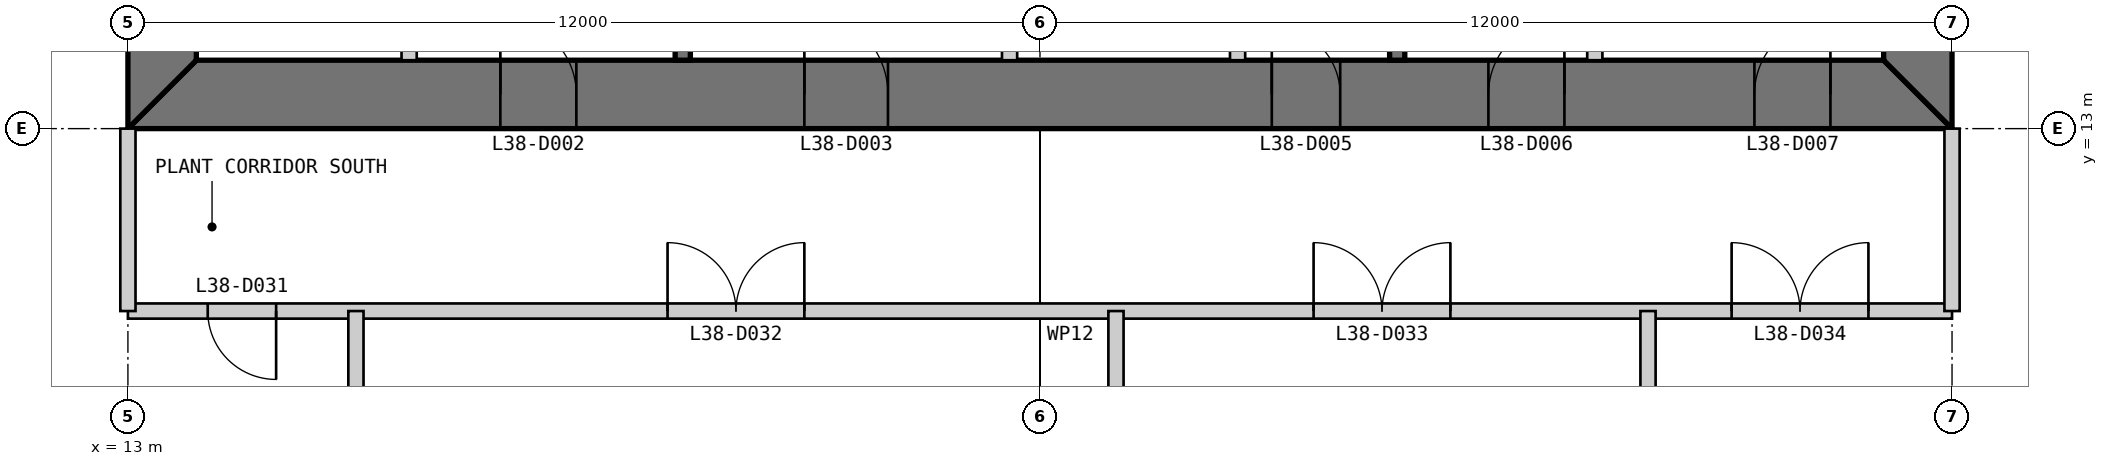
"""IFC4 building model, lengths in metres.
Left out: names, types, materials, properties, quantities, classifications, styles, units other than length and angle.
Written with IfcOpenShell. Run it as: python <this file> out.ifc"""

import sys

from ifc_helpers import new_model, si_unit, direction, frame, frame_2d, origin, place, context, subcontext, project, spatial, polyline, rectangle, outline, extrude, element, fill, save


model = new_model("IFC4")
c1 = context("Model", 3, precision=1e-05, world=origin(), true_north=direction((0.0, 1.0)))
c2 = subcontext(c1, "Body", "Model", "MODEL_VIEW")
j1 = project(units=[si_unit("LENGTHUNIT", "METRE"), si_unit("PLANEANGLEUNIT", "RADIAN")], contexts=[c1])
p1 = place(None, origin())
s1 = spatial("IfcSite", under=j1, at=p1, CompositionType="ELEMENT")
p2 = place(p1, origin())
s2 = spatial("IfcBuilding", under=s1, at=p2, CompositionType="ELEMENT")
p3 = place(p2, frame((0.0, 0.0, 162.4)))
s3 = spatial("IfcBuildingStorey", under=s2, at=p3, CompositionType="ELEMENT", Elevation=162.4)
p4 = place(p3, frame((13.0, 13.45, 0.0), z_axis=(0.0, 0.0, 1.0), x_axis=(1.0, 0.0, 0.0)))
e1 = element("IfcWall", 1, at=p4, inside=s3, PredefinedType="SHEAR", context=c2, shape_type="SweptSolid", body=[
    extrude(outline(polyline([(0.0, -0.45), (24.0, -0.45), (23.1, 0.45), (0.9, 0.45), (0.0, -0.45)])), origin(), (0.0, 0.0, 1.0), 6.0),
])
p5 = place(p4, frame((4.9, 0.0, 0.0)))
e2 = element("IfcOpeningElement", 2, at=p5, cuts=e1, PredefinedType="OPENING", context=c2, shape_type="SweptSolid", body=[
    extrude(rectangle(XDim=1.0, YDim=2.2, at=frame_2d((0.5, 1.1))), frame((0.0, 0.46, 0.0), z_axis=(0.0, -1.0, 0.0), x_axis=(1.0, 0.0, 0.0)), (0.0, 0.0, 1.0), 0.92),
])
p6 = place(p4, frame((8.9, 0.0, 0.0)))
e3 = element("IfcOpeningElement", 3, at=p6, cuts=e1, PredefinedType="OPENING", context=c2, shape_type="SweptSolid", body=[
    extrude(rectangle(XDim=1.1, YDim=2.2, at=frame_2d((0.55, 1.1))), frame((0.0, 0.46, 0.0), z_axis=(0.0, -1.0, 0.0), x_axis=(1.0, 0.0, 0.0)), (0.0, 0.0, 1.0), 0.92),
])
p7 = place(p4, frame((15.05, 0.0, 0.0)))
e4 = element("IfcOpeningElement", 4, at=p7, cuts=e1, PredefinedType="OPENING", context=c2, shape_type="SweptSolid", body=[
    extrude(rectangle(XDim=0.9, YDim=2.2, at=frame_2d((0.45, 1.1))), frame((0.0, 0.46, 0.0), z_axis=(0.0, -1.0, 0.0), x_axis=(1.0, 0.0, 0.0)), (0.0, 0.0, 1.0), 0.92),
])
p8 = place(p4, frame((17.9, 0.0, 0.0)))
e5 = element("IfcOpeningElement", 5, at=p8, cuts=e1, PredefinedType="OPENING", context=c2, shape_type="SweptSolid", body=[
    extrude(rectangle(XDim=1.0, YDim=2.2, at=frame_2d((0.5, 1.1))), frame((0.0, 0.46, 0.0), z_axis=(0.0, -1.0, 0.0), x_axis=(1.0, 0.0, 0.0)), (0.0, 0.0, 1.0), 0.92),
])
p9 = place(p4, frame((21.4, 0.0, 0.0)))
e6 = element("IfcOpeningElement", 6, at=p9, cuts=e1, PredefinedType="OPENING", context=c2, shape_type="SweptSolid", body=[
    extrude(rectangle(XDim=1.0, YDim=2.2, at=frame_2d((0.5, 1.1))), frame((0.0, 0.46, 0.0), z_axis=(0.0, -1.0, 0.0), x_axis=(1.0, 0.0, 0.0)), (0.0, 0.0, 1.0), 0.92),
])
p10 = place(p3, frame((36.55, 13.9, 0.0), z_axis=(0.0, 0.0, 1.0), x_axis=(0.0, 1.0, 0.0)))
e7 = element("IfcWall", 7, at=p10, inside=s3, PredefinedType="SHEAR", context=c2, shape_type="SweptSolid", body=[
    extrude(outline(polyline([(-0.9, -0.45), (23.1, -0.45), (22.2, 0.45), (0.0, 0.45), (-0.9, -0.45)])), origin(), (0.0, 0.0, 1.0), 6.0),
])
p11 = place(p10, frame((20.2, 0.0, 0.0)))
e8 = element("IfcOpeningElement", 8, at=p11, cuts=e7, PredefinedType="OPENING", context=c2, shape_type="SweptSolid", body=[
    extrude(rectangle(XDim=1.0, YDim=2.2, at=frame_2d((0.5, 1.1))), frame((0.0, 0.46, 0.0), z_axis=(0.0, -1.0, 0.0), x_axis=(1.0, 0.0, 0.0)), (0.0, 0.0, 1.0), 0.92),
])
p12 = place(p10, frame((17.25, 0.0, 0.0)))
e9 = element("IfcOpeningElement", 9, at=p12, cuts=e7, PredefinedType="OPENING", context=c2, shape_type="SweptSolid", body=[
    extrude(rectangle(XDim=0.9, YDim=2.2, at=frame_2d((0.45, 1.1))), frame((0.0, 0.46, 0.0), z_axis=(0.0, -1.0, 0.0), x_axis=(1.0, 0.0, 0.0)), (0.0, 0.0, 1.0), 0.92),
])
p13 = place(p3, frame((13.45, 36.1, 0.0), z_axis=(0.0, 0.0, 1.0), x_axis=(0.0, -1.0, 0.0)))
e10 = element("IfcWall", 10, at=p13, inside=s3, PredefinedType="SHEAR", context=c2, shape_type="SweptSolid", body=[
    extrude(outline(polyline([(-0.9, -0.45), (23.1, -0.45), (22.2, 0.45), (0.0, 0.45), (-0.9, -0.45)])), origin(), (0.0, 0.0, 1.0), 6.0),
])
p14 = place(p13, frame((20.2, 0.0, 0.0)))
e11 = element("IfcOpeningElement", 11, at=p14, cuts=e10, PredefinedType="OPENING", context=c2, shape_type="SweptSolid", body=[
    extrude(rectangle(XDim=1.0, YDim=2.2, at=frame_2d((0.5, 1.1))), frame((0.0, 0.46, 0.0), z_axis=(0.0, -1.0, 0.0), x_axis=(1.0, 0.0, 0.0)), (0.0, 0.0, 1.0), 0.92),
])
p15 = place(p13, frame((17.25, 0.0, 0.0)))
e12 = element("IfcOpeningElement", 12, at=p15, cuts=e10, PredefinedType="OPENING", context=c2, shape_type="SweptSolid", body=[
    extrude(rectangle(XDim=0.9, YDim=2.2, at=frame_2d((0.45, 1.1))), frame((0.0, 0.46, 0.0), z_axis=(0.0, -1.0, 0.0), x_axis=(1.0, 0.0, 0.0)), (0.0, 0.0, 1.0), 0.92),
])
p16 = place(p3, frame((16.7, 13.9, 0.0), z_axis=(0.0, 0.0, 1.0), x_axis=(0.0, 1.0, 0.0)))
e13 = element("IfcWall", 13, at=p16, inside=s3, PredefinedType="PARTITIONING", context=c2, shape_type="SweptSolid", body=[
    extrude(rectangle(XDim=16.1, YDim=0.2, at=frame_2d((8.05, 0.0))), origin(), (0.0, 0.0, 1.0), 5.8),
])
p17 = place(p16, frame((8.15, 0.0, 0.0)))
e14 = element("IfcOpeningElement", 14, at=p17, cuts=e13, PredefinedType="OPENING", context=c2, shape_type="SweptSolid", body=[
    extrude(rectangle(XDim=0.9, YDim=2.2, at=frame_2d((0.45, 1.1))), frame((0.0, 0.11, 0.0), z_axis=(0.0, -1.0, 0.0), x_axis=(1.0, 0.0, 0.0)), (0.0, 0.0, 1.0), 0.22),
])
p18 = place(p16, frame((12.4, 0.0, 0.0)))
e15 = element("IfcOpeningElement", 15, at=p18, cuts=e13, PredefinedType="OPENING", context=c2, shape_type="SweptSolid", body=[
    extrude(rectangle(XDim=0.9, YDim=2.2, at=frame_2d((0.45, 1.1))), frame((0.0, 0.11, 0.0), z_axis=(0.0, -1.0, 0.0), x_axis=(1.0, 0.0, 0.0)), (0.0, 0.0, 1.0), 0.22),
])
p19 = place(p3, frame((20.3, 13.9, 0.0), z_axis=(0.0, 0.0, 1.0), x_axis=(0.0, 1.0, 0.0)))
e16 = element("IfcWall", 16, at=p19, inside=s3, PredefinedType="SOLIDWALL", context=c2, shape_type="SweptSolid", body=[
    extrude(rectangle(XDim=16.1, YDim=0.2, at=frame_2d((8.05, 0.0))), origin(), (0.0, 0.0, 1.0), 5.8),
])
p20 = place(p3, frame((24.6, 13.9, 0.0), z_axis=(0.0, 0.0, 1.0), x_axis=(0.0, 1.0, 0.0)))
e17 = element("IfcWall", 17, at=p20, inside=s3, PredefinedType="PARTITIONING", context=c2, shape_type="SweptSolid", body=[
    extrude(rectangle(XDim=3.3, YDim=0.2, at=frame_2d((1.65, 0.0))), origin(), (0.0, 0.0, 1.0), 5.8),
])
p21 = place(p20, frame((0.9, 0.0, 0.0)))
e18 = element("IfcOpeningElement", 18, at=p21, cuts=e17, PredefinedType="OPENING", context=c2, shape_type="SweptSolid", body=[
    extrude(rectangle(XDim=1.1, YDim=2.2, at=frame_2d((0.55, 1.1))), frame((0.0, 0.11, 0.0), z_axis=(0.0, -1.0, 0.0), x_axis=(1.0, 0.0, 0.0)), (0.0, 0.0, 1.0), 0.22),
])
p22 = place(p3, frame((27.6, 13.9, 0.0), z_axis=(0.0, 0.0, 1.0), x_axis=(0.0, 1.0, 0.0)))
e19 = element("IfcWall", 19, at=p22, inside=s3, PredefinedType="PARTITIONING", context=c2, shape_type="SweptSolid", body=[
    extrude(rectangle(XDim=3.3, YDim=0.2, at=frame_2d((1.65, 0.0))), origin(), (0.0, 0.0, 1.0), 5.8),
])
p23 = place(p3, frame((29.7, 13.9, 0.0), z_axis=(0.0, 0.0, 1.0), x_axis=(0.0, 1.0, 0.0)))
e20 = element("IfcWall", 20, at=p23, inside=s3, PredefinedType="SOLIDWALL", context=c2, shape_type="SweptSolid", body=[
    extrude(rectangle(XDim=6.1, YDim=0.2, at=frame_2d((3.05, 0.0))), origin(), (0.0, 0.0, 1.0), 5.8),
])
p24 = place(p3, frame((32.3, 13.9, 0.0), z_axis=(0.0, 0.0, 1.0), x_axis=(0.0, 1.0, 0.0)))
e21 = element("IfcWall", 21, at=p24, inside=s3, PredefinedType="PARTITIONING", context=c2, shape_type="SweptSolid", body=[
    extrude(rectangle(XDim=6.1, YDim=0.2, at=frame_2d((3.05, 0.0))), origin(), (0.0, 0.0, 1.0), 5.8),
])
p25 = place(p3, frame((13.0, 10.6, 0.0), z_axis=(0.0, 0.0, 1.0), x_axis=(1.0, 0.0, 0.0)))
e22 = element("IfcWall", 22, at=p25, inside=s3, PredefinedType="PARTITIONING", context=c2, shape_type="SweptSolid", body=[
    extrude(rectangle(XDim=24.0, YDim=0.2, at=frame_2d((12.0, 0.0))), origin(), (0.0, 0.0, 1.0), 5.8),
])
p26 = place(p25, frame((1.05, 0.0, 0.0)))
e23 = element("IfcOpeningElement", 23, at=p26, cuts=e22, PredefinedType="OPENING", context=c2, shape_type="SweptSolid", body=[
    extrude(rectangle(XDim=0.9, YDim=2.2, at=frame_2d((0.45, 1.1))), frame((0.0, 0.11, 0.0), z_axis=(0.0, -1.0, 0.0), x_axis=(1.0, 0.0, 0.0)), (0.0, 0.0, 1.0), 0.22),
])
p27 = place(p25, frame((7.1, 0.0, 0.0)))
e24 = element("IfcOpeningElement", 24, at=p27, cuts=e22, PredefinedType="OPENING", context=c2, shape_type="SweptSolid", body=[
    extrude(rectangle(XDim=1.8, YDim=2.4, at=frame_2d((0.9, 1.2))), frame((0.0, 0.11, 0.0), z_axis=(0.0, -1.0, 0.0), x_axis=(1.0, 0.0, 0.0)), (0.0, 0.0, 1.0), 0.22),
])
p28 = place(p25, frame((15.6, 0.0, 0.0)))
e25 = element("IfcOpeningElement", 25, at=p28, cuts=e22, PredefinedType="OPENING", context=c2, shape_type="SweptSolid", body=[
    extrude(rectangle(XDim=1.8, YDim=2.4, at=frame_2d((0.9, 1.2))), frame((0.0, 0.11, 0.0), z_axis=(0.0, -1.0, 0.0), x_axis=(1.0, 0.0, 0.0)), (0.0, 0.0, 1.0), 0.22),
])
p29 = place(p25, frame((21.1, 0.0, 0.0)))
e26 = element("IfcOpeningElement", 26, at=p29, cuts=e22, PredefinedType="OPENING", context=c2, shape_type="SweptSolid", body=[
    extrude(rectangle(XDim=1.8, YDim=2.4, at=frame_2d((0.9, 1.2))), frame((0.0, 0.11, 0.0), z_axis=(0.0, -1.0, 0.0), x_axis=(1.0, 0.0, 0.0)), (0.0, 0.0, 1.0), 0.22),
])
for number, where, z_axis, x_axis in (
    (27, (13.0, 10.6, 0.0), (0.0, 0.0, 1.0), (0.0, 1.0, 0.0)),
    (28, (37.0, 10.6, 0.0), (0.0, 0.0, 1.0), (0.0, 1.0, 0.0)),
):
    element("IfcWall", number, at=place(p3, frame(where, z_axis=z_axis, x_axis=x_axis)), inside=s3, PredefinedType="PARTITIONING", context=c2, shape_type="SweptSolid", body=[
        extrude(rectangle(XDim=2.4, YDim=0.2, at=frame_2d((1.2, 0.0))), origin(), (0.0, 0.0, 1.0), 4.807),
    ])
p30 = place(p3, frame((16.0, 2.0, 0.0), z_axis=(0.0, 0.0, 1.0), x_axis=(0.0, 1.0, 0.0)))
e29 = element("IfcWall", 29, at=p30, inside=s3, PredefinedType="PARTITIONING", context=c2, shape_type="SweptSolid", body=[
    extrude(rectangle(XDim=8.6, YDim=0.2, at=frame_2d((4.3, 0.0))), origin(), (0.0, 0.0, 1.0), 4.954),
])
p31 = place(p30, frame((4.9, 0.0, 0.0)))
e30 = element("IfcOpeningElement", 30, at=p31, cuts=e29, PredefinedType="OPENING", context=c2, shape_type="SweptSolid", body=[
    extrude(rectangle(XDim=1.8, YDim=2.4, at=frame_2d((0.9, 1.2))), frame((0.0, 0.11, 0.0), z_axis=(0.0, -1.0, 0.0), x_axis=(1.0, 0.0, 0.0)), (0.0, 0.0, 1.0), 0.22),
])
p32 = place(p3, frame((26.0, 2.0, 0.0), z_axis=(0.0, 0.0, 1.0), x_axis=(0.0, 1.0, 0.0)))
e31 = element("IfcWall", 31, at=p32, inside=s3, PredefinedType="PARTITIONING", context=c2, shape_type="SweptSolid", body=[
    extrude(rectangle(XDim=8.6, YDim=0.2, at=frame_2d((4.3, 0.0))), origin(), (0.0, 0.0, 1.0), 5.8),
])
p33 = place(p32, frame((3.4, 0.0, 0.0)))
e32 = element("IfcOpeningElement", 32, at=p33, cuts=e31, PredefinedType="OPENING", context=c2, shape_type="SweptSolid", body=[
    extrude(rectangle(XDim=1.8, YDim=2.4, at=frame_2d((0.9, 1.2))), frame((0.0, 0.11, 0.0), z_axis=(0.0, -1.0, 0.0), x_axis=(1.0, 0.0, 0.0)), (0.0, 0.0, 1.0), 0.22),
])
p34 = place(p3, frame((33.0, 2.0, 0.0), z_axis=(0.0, 0.0, 1.0), x_axis=(0.0, 1.0, 0.0)))
e33 = element("IfcWall", 33, at=p34, inside=s3, PredefinedType="PARTITIONING", context=c2, shape_type="SweptSolid", body=[
    extrude(rectangle(XDim=8.6, YDim=0.2, at=frame_2d((4.3, 0.0))), origin(), (0.0, 0.0, 1.0), 5.8),
])
p35 = place(p34, frame((3.4, 0.0, 0.0)))
e34 = element("IfcOpeningElement", 34, at=p35, cuts=e33, PredefinedType="OPENING", context=c2, shape_type="SweptSolid", body=[
    extrude(rectangle(XDim=1.8, YDim=2.4, at=frame_2d((0.9, 1.2))), frame((0.0, 0.11, 0.0), z_axis=(0.0, -1.0, 0.0), x_axis=(1.0, 0.0, 0.0)), (0.0, 0.0, 1.0), 0.22),
])
p36 = place(p5, origin())
e35 = element("IfcDoor", 35, at=p36, inside=s3, OperationType="SINGLE_SWING_LEFT", PredefinedType="DOOR", context=c2, shape_type="SweptSolid", body=[
    extrude(rectangle(XDim=1.0, YDim=2.2, at=frame_2d((0.5, 1.1))), frame((0.0, 0.025, 0.0), z_axis=(0.0, -1.0, 0.0), x_axis=(1.0, 0.0, 0.0)), (0.0, 0.0, 1.0), 0.05),
    extrude(outline(polyline([(0.0, 0.0), (0.04, 0.0), (0.04, 2.16), (0.96, 2.16), (0.96, 0.0), (1.0, 0.0), (1.0, 2.2), (0.0, 2.2), (0.0, 0.0)])), frame((0.0, 0.3, 0.0), z_axis=(0.0, -1.0, 0.0), x_axis=(1.0, 0.0, 0.0)), (0.0, 0.0, 1.0), 0.6),
])
fill(e2, e35)
p37 = place(p6, origin())
e36 = element("IfcDoor", 36, at=p37, inside=s3, OperationType="SINGLE_SWING_LEFT", PredefinedType="DOOR", context=c2, shape_type="SweptSolid", body=[
    extrude(rectangle(XDim=1.1, YDim=2.2, at=frame_2d((0.55, 1.1))), frame((0.0, 0.025, 0.0), z_axis=(0.0, -1.0, 0.0), x_axis=(1.0, 0.0, 0.0)), (0.0, 0.0, 1.0), 0.05),
    extrude(outline(polyline([(0.0, 0.0), (0.04, 0.0), (0.04, 2.16), (1.06, 2.16), (1.06, 0.0), (1.1, 0.0), (1.1, 2.2), (0.0, 2.2), (0.0, 0.0)])), frame((0.0, 0.3, 0.0), z_axis=(0.0, -1.0, 0.0), x_axis=(1.0, 0.0, 0.0)), (0.0, 0.0, 1.0), 0.6),
])
fill(e3, e36)
p38 = place(p7, origin())
e37 = element("IfcDoor", 37, at=p38, inside=s3, OperationType="SINGLE_SWING_LEFT", PredefinedType="DOOR", context=c2, shape_type="SweptSolid", body=[
    extrude(rectangle(XDim=0.9, YDim=2.2, at=frame_2d((0.45, 1.1))), frame((0.0, 0.025, 0.0), z_axis=(0.0, -1.0, 0.0), x_axis=(1.0, 0.0, 0.0)), (0.0, 0.0, 1.0), 0.05),
    extrude(outline(polyline([(0.0, 0.0), (0.04, 0.0), (0.04, 2.16), (0.86, 2.16), (0.86, 0.0), (0.9, 0.0), (0.9, 2.2), (0.0, 2.2), (0.0, 0.0)])), frame((0.0, 0.3, 0.0), z_axis=(0.0, -1.0, 0.0), x_axis=(1.0, 0.0, 0.0)), (0.0, 0.0, 1.0), 0.6),
])
fill(e4, e37)
p39 = place(p8, origin())
e38 = element("IfcDoor", 38, at=p39, inside=s3, OperationType="SINGLE_SWING_RIGHT", PredefinedType="DOOR", context=c2, shape_type="SweptSolid", body=[
    extrude(rectangle(XDim=1.0, YDim=2.2, at=frame_2d((0.5, 1.1))), frame((0.0, 0.025, 0.0), z_axis=(0.0, -1.0, 0.0), x_axis=(1.0, 0.0, 0.0)), (0.0, 0.0, 1.0), 0.05),
    extrude(outline(polyline([(0.0, 0.0), (0.04, 0.0), (0.04, 2.16), (0.96, 2.16), (0.96, 0.0), (1.0, 0.0), (1.0, 2.2), (0.0, 2.2), (0.0, 0.0)])), frame((0.0, 0.3, 0.0), z_axis=(0.0, -1.0, 0.0), x_axis=(1.0, 0.0, 0.0)), (0.0, 0.0, 1.0), 0.6),
])
fill(e5, e38)
p40 = place(p9, origin())
e39 = element("IfcDoor", 39, at=p40, inside=s3, OperationType="SINGLE_SWING_RIGHT", PredefinedType="DOOR", context=c2, shape_type="SweptSolid", body=[
    extrude(rectangle(XDim=1.0, YDim=2.2, at=frame_2d((0.5, 1.1))), frame((0.0, 0.025, 0.0), z_axis=(0.0, -1.0, 0.0), x_axis=(1.0, 0.0, 0.0)), (0.0, 0.0, 1.0), 0.05),
    extrude(outline(polyline([(0.0, 0.0), (0.04, 0.0), (0.04, 2.16), (0.96, 2.16), (0.96, 0.0), (1.0, 0.0), (1.0, 2.2), (0.0, 2.2), (0.0, 0.0)])), frame((0.0, 0.3, 0.0), z_axis=(0.0, -1.0, 0.0), x_axis=(1.0, 0.0, 0.0)), (0.0, 0.0, 1.0), 0.6),
])
fill(e6, e39)
p41 = place(p26, frame((0.9, 0.0, 0.0), z_axis=(0.0, 0.0, 1.0), x_axis=(-1.0, 0.0, 0.0)))
e40 = element("IfcDoor", 40, at=p41, inside=s3, OperationType="SINGLE_SWING_LEFT", PredefinedType="DOOR", context=c2, shape_type="SweptSolid", body=[
    extrude(rectangle(XDim=0.9, YDim=2.2, at=frame_2d((0.45, 1.1))), frame((0.0, 0.025, 0.0), z_axis=(0.0, -1.0, 0.0), x_axis=(1.0, 0.0, 0.0)), (0.0, 0.0, 1.0), 0.05),
])
fill(e23, e40)
p42 = place(p27, origin())
e41 = element("IfcDoor", 41, at=p42, inside=s3, OperationType="DOUBLE_DOOR_SINGLE_SWING", PredefinedType="DOOR", context=c2, shape_type="SweptSolid", body=[
    extrude(rectangle(XDim=1.8, YDim=2.4, at=frame_2d((0.9, 1.2))), frame((0.0, 0.025, 0.0), z_axis=(0.0, -1.0, 0.0), x_axis=(1.0, 0.0, 0.0)), (0.0, 0.0, 1.0), 0.05),
])
fill(e24, e41)
p43 = place(p28, origin())
e42 = element("IfcDoor", 42, at=p43, inside=s3, OperationType="DOUBLE_DOOR_SINGLE_SWING", PredefinedType="DOOR", context=c2, shape_type="SweptSolid", body=[
    extrude(rectangle(XDim=1.8, YDim=2.4, at=frame_2d((0.9, 1.2))), frame((0.0, 0.025, 0.0), z_axis=(0.0, -1.0, 0.0), x_axis=(1.0, 0.0, 0.0)), (0.0, 0.0, 1.0), 0.05),
])
fill(e25, e42)
p44 = place(p29, origin())
e43 = element("IfcDoor", 43, at=p44, inside=s3, OperationType="DOUBLE_DOOR_SINGLE_SWING", PredefinedType="DOOR", context=c2, shape_type="SweptSolid", body=[
    extrude(rectangle(XDim=1.8, YDim=2.4, at=frame_2d((0.9, 1.2))), frame((0.0, 0.025, 0.0), z_axis=(0.0, -1.0, 0.0), x_axis=(1.0, 0.0, 0.0)), (0.0, 0.0, 1.0), 0.05),
])
fill(e26, e43)
save(model, sys.argv[1])
